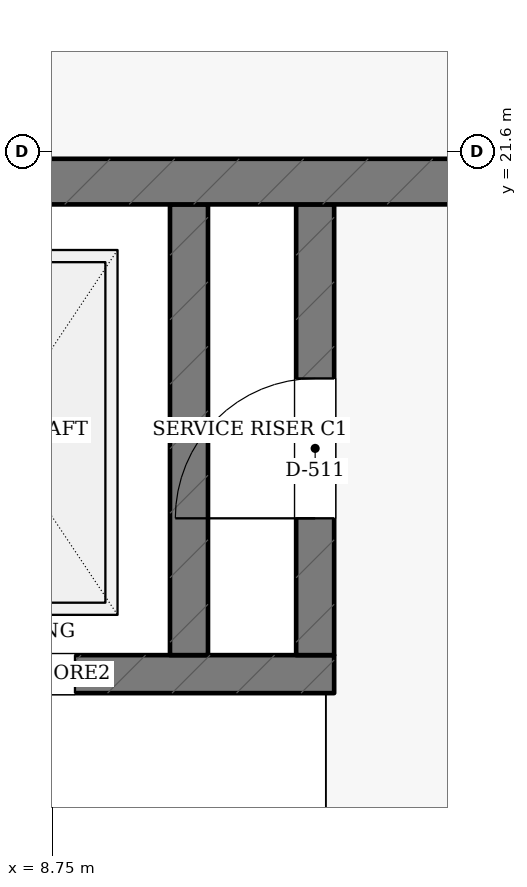
"""IFC4 building model, lengths in metres.
Left out: names, types, materials, properties, quantities, classifications, styles, units other than length and angle.
Written with IfcOpenShell. Run it as: python <this file> out.ifc"""

import sys

from ifc_helpers import new_model, si_unit, direction, frame, frame_2d, origin, place, context, subcontext, project, spatial, rectangle, extrude, element, fill, save


model = new_model("IFC4")
c1 = context("Model", 3, precision=1e-05, world=origin(), true_north=direction((0.0, 1.0)))
c2 = subcontext(c1, "Body", "Model", "MODEL_VIEW")
j1 = project(units=[si_unit("LENGTHUNIT", "METRE"), si_unit("PLANEANGLEUNIT", "RADIAN")], contexts=[c1])
p1 = place(None, origin())
s1 = spatial("IfcSite", under=j1, at=p1, CompositionType="ELEMENT")
p2 = place(p1, origin())
s2 = spatial("IfcBuilding", under=s1, at=p2, CompositionType="ELEMENT")
p3 = place(p2, frame((0.0, 0.0, 9.9)))
s3 = spatial("IfcBuildingStorey", under=s2, at=p3, CompositionType="ELEMENT", Elevation=9.9)
p4 = place(p3, frame((7.025, 18.16, 0.0), z_axis=(0.0, 0.0, 1.0), x_axis=(1.0, 0.0, 0.0)))
e1 = element("IfcWall", 1, at=p4, inside=s3, PredefinedType="SHEAR", context=c2, shape_type="SweptSolid", body=[
    extrude(rectangle(XDim=3.58, YDim=0.25, at=frame_2d((1.79, 0.0))), origin(), (0.0, 0.0, 1.0), 3.6),
])
p5 = place(p4, frame((0.775, 0.0, 0.0)))
e2 = element("IfcOpeningElement", 2, at=p5, cuts=e1, PredefinedType="OPENING", context=c2, shape_type="SweptSolid", body=[
    extrude(rectangle(XDim=1.1, YDim=2.15, at=frame_2d((0.55, 1.075))), frame((0.0, 0.135, 0.0), z_axis=(0.0, -1.0, 0.0), x_axis=(1.0, 0.0, 0.0)), (0.0, 0.0, 1.0), 0.27),
])
p6 = place(p3, frame((9.65, 18.285, 0.0), z_axis=(0.0, 0.0, 1.0), x_axis=(0.0, 1.0, 0.0)))
e3 = element("IfcWall", 3, at=p6, inside=s3, PredefinedType="SHEAR", context=c2, shape_type="SweptSolid", body=[
    extrude(rectangle(XDim=2.965, YDim=0.25, at=frame_2d((1.482, 0.0))), origin(), (0.0, 0.0, 1.0), 3.6),
])
p7 = place(p3, frame((10.48, 18.285, 0.0), z_axis=(0.0, 0.0, 1.0), x_axis=(0.0, 1.0, 0.0)))
e4 = element("IfcWall", 4, at=p7, inside=s3, PredefinedType="SHEAR", context=c2, shape_type="SweptSolid", body=[
    extrude(rectangle(XDim=2.965, YDim=0.25, at=frame_2d((1.482, 0.0))), origin(), (0.0, 0.0, 1.0), 3.6),
])
p8 = place(p7, frame((0.9, 0.0, 0.0)))
e5 = element("IfcOpeningElement", 5, at=p8, cuts=e4, PredefinedType="OPENING", context=c2, shape_type="SweptSolid", body=[
    extrude(rectangle(XDim=0.92, YDim=2.05, at=frame_2d((0.46, 1.025))), frame((0.0, 0.135, 0.0), z_axis=(0.0, -1.0, 0.0), x_axis=(1.0, 0.0, 0.0)), (0.0, 0.0, 1.0), 0.27),
])
p9 = place(p3, frame((0.17, 21.4, 0.0), z_axis=(0.0, 0.0, 1.0), x_axis=(1.0, 0.0, 0.0)))
e6 = element("IfcWall", 6, at=p9, inside=s3, PredefinedType="SHEAR", context=c2, shape_type="SweptSolid", body=[
    extrude(rectangle(XDim=14.23, YDim=0.3, at=frame_2d((7.115, 0.0))), origin(), (0.0, 0.0, 1.0), 3.6),
])
p10 = place(p5, origin())
e7 = element("IfcDoor", 7, at=p10, inside=s3, OperationType="SLIDING_TO_LEFT", PredefinedType="DOOR", context=c2, shape_type="SweptSolid", body=[
    extrude(rectangle(XDim=1.1, YDim=2.15, at=frame_2d((0.55, 1.075))), frame((0.0, 0.025, 0.0), z_axis=(0.0, -1.0, 0.0), x_axis=(1.0, 0.0, 0.0)), (0.0, 0.0, 1.0), 0.05),
])
fill(e2, e7)
p11 = place(p8, origin())
e8 = element("IfcDoor", 8, at=p11, inside=s3, OperationType="SINGLE_SWING_LEFT", PredefinedType="DOOR", context=c2, shape_type="SweptSolid", body=[
    extrude(rectangle(XDim=0.92, YDim=2.05, at=frame_2d((0.46, 1.025))), frame((0.0, 0.025, 0.0), z_axis=(0.0, -1.0, 0.0), x_axis=(1.0, 0.0, 0.0)), (0.0, 0.0, 1.0), 0.05),
])
fill(e5, e8)
save(model, sys.argv[1])
